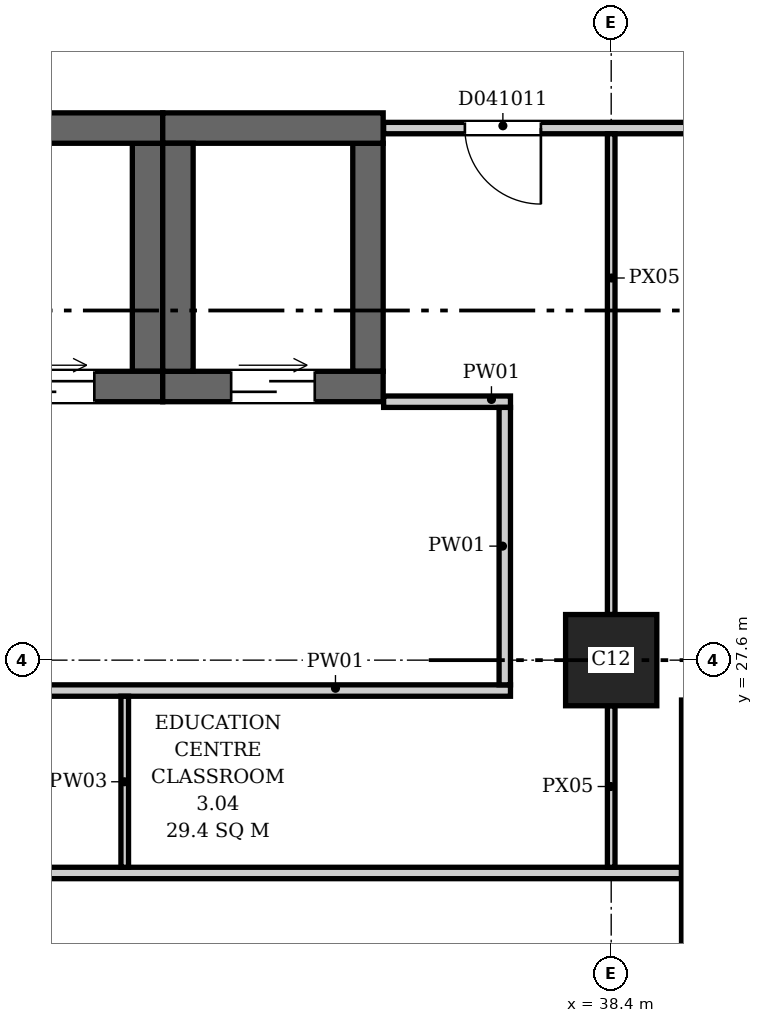
"""IFC4 building model, lengths in metres.
Left out: names, types, materials, properties, quantities, classifications, styles, units other than length and angle.
Written with IfcOpenShell. Run it as: python <this file> out.ifc"""

import sys

from ifc_helpers import new_model, si_unit, direction, frame, frame_2d, origin, origin_2d, place, context, subcontext, project, spatial, rectangle, extrude, element, fill, save


model = new_model("IFC4")
c1 = context("Model", 3, precision=1e-05, world=origin(), true_north=direction((0.0, 1.0)))
c2 = subcontext(c1, "Body", "Model", "MODEL_VIEW")
j1 = project(units=[si_unit("LENGTHUNIT", "METRE"), si_unit("PLANEANGLEUNIT", "RADIAN")], contexts=[c1])
p1 = place(None, origin())
s1 = spatial("IfcSite", under=j1, at=p1, CompositionType="ELEMENT")
p2 = place(p1, origin())
s2 = spatial("IfcBuilding", under=s1, at=p2, CompositionType="ELEMENT")
p3 = place(p2, frame((0.0, 0.0, 21.7)))
s3 = spatial("IfcBuildingStorey", under=s2, at=p3, CompositionType="ELEMENT", Elevation=21.7)
p4 = place(p3, frame((29.6, 31.2, 0.0), z_axis=(0.0, 0.0, 1.0), x_axis=(1.0, 0.0, 0.0)))
e1 = element("IfcWall", 1, at=p4, inside=s3, PredefinedType="SHEAR", context=c2, shape_type="SweptSolid", body=[
    extrude(rectangle(XDim=2.9, YDim=0.4, at=frame_2d((1.45, 0.0))), origin(), (0.0, 0.0, 1.0), 5.0),
])
p5 = place(p4, frame((0.9, 0.0, 0.0)))
e2 = element("IfcOpeningElement", 2, at=p5, cuts=e1, PredefinedType="OPENING", context=c2, shape_type="SweptSolid", body=[
    extrude(rectangle(XDim=1.1, YDim=2.1, at=frame_2d((0.55, 1.05))), frame((0.0, 0.21, 0.0), z_axis=(0.0, -1.0, 0.0), x_axis=(1.0, 0.0, 0.0)), (0.0, 0.0, 1.0), 0.42),
])
p6 = place(p3, frame((29.6, 34.6, 0.0), z_axis=(0.0, 0.0, 1.0), x_axis=(1.0, 0.0, 0.0)))
e3 = element("IfcWall", 3, at=p6, inside=s3, PredefinedType="SHEAR", context=c2, shape_type="SweptSolid", body=[
    extrude(rectangle(XDim=2.9, YDim=0.4, at=frame_2d((1.45, 0.0))), origin(), (0.0, 0.0, 1.0), 5.0),
])
p7 = place(p3, frame((32.3, 31.4, 0.0), z_axis=(0.0, 0.0, 1.0), x_axis=(0.0, 1.0, 0.0)))
e4 = element("IfcWall", 4, at=p7, inside=s3, PredefinedType="SHEAR", context=c2, shape_type="SweptSolid", body=[
    extrude(rectangle(XDim=3.0, YDim=0.4, at=frame_2d((1.5, 0.0))), origin(), (0.0, 0.0, 1.0), 5.0),
])
p8 = place(p3, frame((32.5, 31.2, 0.0), z_axis=(0.0, 0.0, 1.0), x_axis=(1.0, 0.0, 0.0)))
e5 = element("IfcWall", 5, at=p8, inside=s3, PredefinedType="SHEAR", context=c2, shape_type="SweptSolid", body=[
    extrude(rectangle(XDim=2.9, YDim=0.4, at=frame_2d((1.45, 0.0))), origin(), (0.0, 0.0, 1.0), 5.0),
])
p9 = place(p8, frame((0.9, 0.0, 0.0)))
e6 = element("IfcOpeningElement", 6, at=p9, cuts=e5, PredefinedType="OPENING", context=c2, shape_type="SweptSolid", body=[
    extrude(rectangle(XDim=1.1, YDim=2.1, at=frame_2d((0.55, 1.05))), frame((0.0, 0.21, 0.0), z_axis=(0.0, -1.0, 0.0), x_axis=(1.0, 0.0, 0.0)), (0.0, 0.0, 1.0), 0.42),
])
p10 = place(p3, frame((32.5, 34.6, 0.0), z_axis=(0.0, 0.0, 1.0), x_axis=(1.0, 0.0, 0.0)))
e7 = element("IfcWall", 7, at=p10, inside=s3, PredefinedType="SHEAR", context=c2, shape_type="SweptSolid", body=[
    extrude(rectangle(XDim=2.9, YDim=0.4, at=frame_2d((1.45, 0.0))), origin(), (0.0, 0.0, 1.0), 5.0),
])
for number, where, z_axis, x_axis in (
    (8, (32.7, 31.4, 0.0), (0.0, 0.0, 1.0), (0.0, 1.0, 0.0)),
    (9, (35.2, 31.4, 0.0), (0.0, 0.0, 1.0), (0.0, 1.0, 0.0)),
):
    element("IfcWall", number, at=place(p3, frame(where, z_axis=z_axis, x_axis=x_axis)), inside=s3, PredefinedType="SHEAR", context=c2, shape_type="SweptSolid", body=[
        extrude(rectangle(XDim=3.0, YDim=0.4, at=frame_2d((1.5, 0.0))), origin(), (0.0, 0.0, 1.0), 5.0),
    ])
p11 = place(p3, frame((38.4, 27.6, 0.0), z_axis=(0.0, 0.0, 1.0), x_axis=(1.0, 0.0, 0.0)))
e10 = element("IfcColumn", 10, at=p11, inside=s3, PredefinedType="COLUMN", context=c2, shape_type="SweptSolid", body=[
    extrude(rectangle(XDim=1.2, YDim=1.2, at=origin_2d()), origin(), (0.0, 0.0, 1.0), 5.0),
])
p12 = place(p3, frame((0.206, 24.8, 0.0), z_axis=(0.0, 0.0, 1.0), x_axis=(1.0, 0.0, 0.0)))
e11 = element("IfcWall", 11, at=p12, inside=s3, PredefinedType="PARTITIONING", context=c2, shape_type="SweptSolid", body=[
    extrude(rectangle(XDim=39.119, YDim=0.15, at=frame_2d((19.56, 0.0))), origin(), (0.0, 0.0, 1.0), 4.65),
])
p13 = place(p12, frame((15.294, 0.0, 0.0)))
e12 = element("IfcOpeningElement", 12, at=p13, cuts=e11, PredefinedType="OPENING", context=c2, shape_type="SweptSolid", body=[
    extrude(rectangle(XDim=1.0, YDim=2.1, at=frame_2d((0.5, 1.05))), frame((0.0, 0.085, 0.0), z_axis=(0.0, -1.0, 0.0), x_axis=(1.0, 0.0, 0.0)), (0.0, 0.0, 1.0), 0.17),
])
p14 = place(p12, frame((21.694, 0.0, 0.0)))
e13 = element("IfcOpeningElement", 13, at=p14, cuts=e11, PredefinedType="OPENING", context=c2, shape_type="SweptSolid", body=[
    extrude(rectangle(XDim=1.0, YDim=2.1, at=frame_2d((0.5, 1.05))), frame((0.0, 0.085, 0.0), z_axis=(0.0, -1.0, 0.0), x_axis=(1.0, 0.0, 0.0)), (0.0, 0.0, 1.0), 0.17),
])
p15 = place(p12, frame((28.094, 0.0, 0.0)))
e14 = element("IfcOpeningElement", 14, at=p15, cuts=e11, PredefinedType="OPENING", context=c2, shape_type="SweptSolid", body=[
    extrude(rectangle(XDim=1.0, YDim=2.1, at=frame_2d((0.5, 1.05))), frame((0.0, 0.085, 0.0), z_axis=(0.0, -1.0, 0.0), x_axis=(1.0, 0.0, 0.0)), (0.0, 0.0, 1.0), 0.17),
])
p16 = place(p3, frame((29.4, 27.2, 0.0), z_axis=(0.0, 0.0, 1.0), x_axis=(1.0, 0.0, 0.0)))
e15 = element("IfcWall", 15, at=p16, inside=s3, PredefinedType="PARTITIONING", context=c2, shape_type="SweptSolid", body=[
    extrude(rectangle(XDim=7.675, YDim=0.15, at=frame_2d((3.837, 0.0))), origin(), (0.0, 0.0, 1.0), 4.65),
])
p17 = place(p3, frame((32.0, 24.875, 0.0), z_axis=(0.0, 0.0, 1.0), x_axis=(0.0, 1.0, 0.0)))
e16 = element("IfcWall", 16, at=p17, inside=s3, PredefinedType="PARTITIONING", context=c2, shape_type="SweptSolid", body=[
    extrude(rectangle(XDim=2.25, YDim=0.1, at=frame_2d((1.125, 0.0))), origin(), (0.0, 0.0, 1.0), 4.65),
])
p18 = place(p3, frame((35.406, 31.0, 0.0), z_axis=(0.0, 0.0, 1.0), x_axis=(1.0, 0.0, 0.0)))
e17 = element("IfcWall", 17, at=p18, inside=s3, PredefinedType="PARTITIONING", context=c2, shape_type="SweptSolid", body=[
    extrude(rectangle(XDim=1.669, YDim=0.15, at=frame_2d((0.834, 0.0))), origin(), (0.0, 0.0, 1.0), 4.65),
])
p19 = place(p3, frame((35.406, 34.6, 0.0), z_axis=(0.0, 0.0, 1.0), x_axis=(1.0, 0.0, 0.0)))
e18 = element("IfcWall", 18, at=p19, inside=s3, PredefinedType="PARTITIONING", context=c2, shape_type="SweptSolid", body=[
    extrude(rectangle(XDim=21.988, YDim=0.15, at=frame_2d((10.994, 0.0))), origin(), (0.0, 0.0, 1.0), 4.65),
])
p20 = place(p19, frame((1.069, 0.0, 0.0)))
e19 = element("IfcOpeningElement", 19, at=p20, cuts=e18, PredefinedType="OPENING", context=c2, shape_type="SweptSolid", body=[
    extrude(rectangle(XDim=1.0, YDim=2.1, at=frame_2d((0.5, 1.05))), frame((0.0, 0.085, 0.0), z_axis=(0.0, -1.0, 0.0), x_axis=(1.0, 0.0, 0.0)), (0.0, 0.0, 1.0), 0.17),
])
p21 = place(p19, frame((5.694, 0.0, 0.0)))
e20 = element("IfcOpeningElement", 20, at=p21, cuts=e18, PredefinedType="OPENING", context=c2, shape_type="SweptSolid", body=[
    extrude(rectangle(XDim=1.0, YDim=2.1, at=frame_2d((0.5, 1.05))), frame((0.0, 0.085, 0.0), z_axis=(0.0, -1.0, 0.0), x_axis=(1.0, 0.0, 0.0)), (0.0, 0.0, 1.0), 0.17),
])
p22 = place(p19, frame((12.094, 0.0, 0.0)))
e21 = element("IfcOpeningElement", 21, at=p22, cuts=e18, PredefinedType="OPENING", context=c2, shape_type="SweptSolid", body=[
    extrude(rectangle(XDim=1.0, YDim=2.1, at=frame_2d((0.5, 1.05))), frame((0.0, 0.085, 0.0), z_axis=(0.0, -1.0, 0.0), x_axis=(1.0, 0.0, 0.0)), (0.0, 0.0, 1.0), 0.17),
])
p23 = place(p19, frame((18.318, 0.0, 0.0)))
e22 = element("IfcOpeningElement", 22, at=p23, cuts=e18, PredefinedType="OPENING", context=c2, shape_type="SweptSolid", body=[
    extrude(rectangle(XDim=1.0, YDim=2.1, at=frame_2d((0.5, 1.05))), frame((0.0, 0.085, 0.0), z_axis=(0.0, -1.0, 0.0), x_axis=(1.0, 0.0, 0.0)), (0.0, 0.0, 1.0), 0.17),
])
p24 = place(p3, frame((37.0, 27.275, 0.0), z_axis=(0.0, 0.0, 1.0), x_axis=(0.0, 1.0, 0.0)))
e23 = element("IfcWall", 23, at=p24, inside=s3, PredefinedType="PARTITIONING", context=c2, shape_type="SweptSolid", body=[
    extrude(rectangle(XDim=3.65, YDim=0.15, at=frame_2d((1.825, 0.0))), origin(), (0.0, 0.0, 1.0), 4.65),
])
p25 = place(p3, frame((38.4, 24.875, 0.0), z_axis=(0.0, 0.0, 1.0), x_axis=(0.0, 1.0, 0.0)))
e24 = element("IfcWall", 24, at=p25, inside=s3, PredefinedType="PARTITIONING", context=c2, shape_type="SweptSolid", body=[
    extrude(rectangle(XDim=2.125, YDim=0.1, at=frame_2d((1.062, 0.0))), origin(), (0.0, 0.0, 1.0), 4.25),
])
p26 = place(p3, frame((38.4, 28.2, 0.0), z_axis=(0.0, 0.0, 1.0), x_axis=(0.0, 1.0, 0.0)))
e25 = element("IfcWall", 25, at=p26, inside=s3, PredefinedType="PARTITIONING", context=c2, shape_type="SweptSolid", body=[
    extrude(rectangle(XDim=6.325, YDim=0.1, at=frame_2d((3.163, 0.0))), origin(), (0.0, 0.0, 1.0), 4.25),
])
p27 = place(p3, frame((39.4, 19.075, 0.0), z_axis=(0.0, 0.0, 1.0), x_axis=(0.0, 1.0, 0.0)))
e26 = element("IfcWall", 26, at=p27, inside=s3, PredefinedType="PARTITIONING", context=c2, shape_type="SweptSolid", body=[
    extrude(rectangle(XDim=8.0, YDim=0.15, at=frame_2d((4.0, 0.0))), origin(), (0.0, 0.0, 1.0), 4.65),
])
p28 = place(p27, frame((3.425, 0.0, 0.0)))
e27 = element("IfcOpeningElement", 27, at=p28, cuts=e26, PredefinedType="OPENING", context=c2, shape_type="SweptSolid", body=[
    extrude(rectangle(XDim=1.0, YDim=2.1, at=frame_2d((0.5, 1.05))), frame((0.0, 0.085, 0.0), z_axis=(0.0, -1.0, 0.0), x_axis=(1.0, 0.0, 0.0)), (0.0, 0.0, 1.0), 0.17),
])
p29 = place(p5, origin())
e28 = element("IfcDoor", 28, at=p29, inside=s3, OperationType="DOUBLE_DOOR_SLIDING", PredefinedType="DOOR", context=c2, shape_type="SweptSolid", body=[
    extrude(rectangle(XDim=1.1, YDim=2.1, at=frame_2d((0.55, 1.05))), frame((0.0, 0.025, 0.0), z_axis=(0.0, -1.0, 0.0), x_axis=(1.0, 0.0, 0.0)), (0.0, 0.0, 1.0), 0.05),
])
fill(e2, e28)
p30 = place(p9, origin())
e29 = element("IfcDoor", 29, at=p30, inside=s3, OperationType="DOUBLE_DOOR_SLIDING", PredefinedType="DOOR", context=c2, shape_type="SweptSolid", body=[
    extrude(rectangle(XDim=1.1, YDim=2.1, at=frame_2d((0.55, 1.05))), frame((0.0, 0.025, 0.0), z_axis=(0.0, -1.0, 0.0), x_axis=(1.0, 0.0, 0.0)), (0.0, 0.0, 1.0), 0.05),
])
fill(e6, e29)
p31 = place(p20, origin())
e30 = element("IfcDoor", 30, at=p31, inside=s3, OperationType="SINGLE_SWING_RIGHT", PredefinedType="DOOR", context=c2, shape_type="SweptSolid", body=[
    extrude(rectangle(XDim=1.0, YDim=2.1, at=frame_2d((0.5, 1.05))), frame((0.0, 0.025, 0.0), z_axis=(0.0, -1.0, 0.0), x_axis=(1.0, 0.0, 0.0)), (0.0, 0.0, 1.0), 0.05),
])
fill(e19, e30)
save(model, sys.argv[1])
